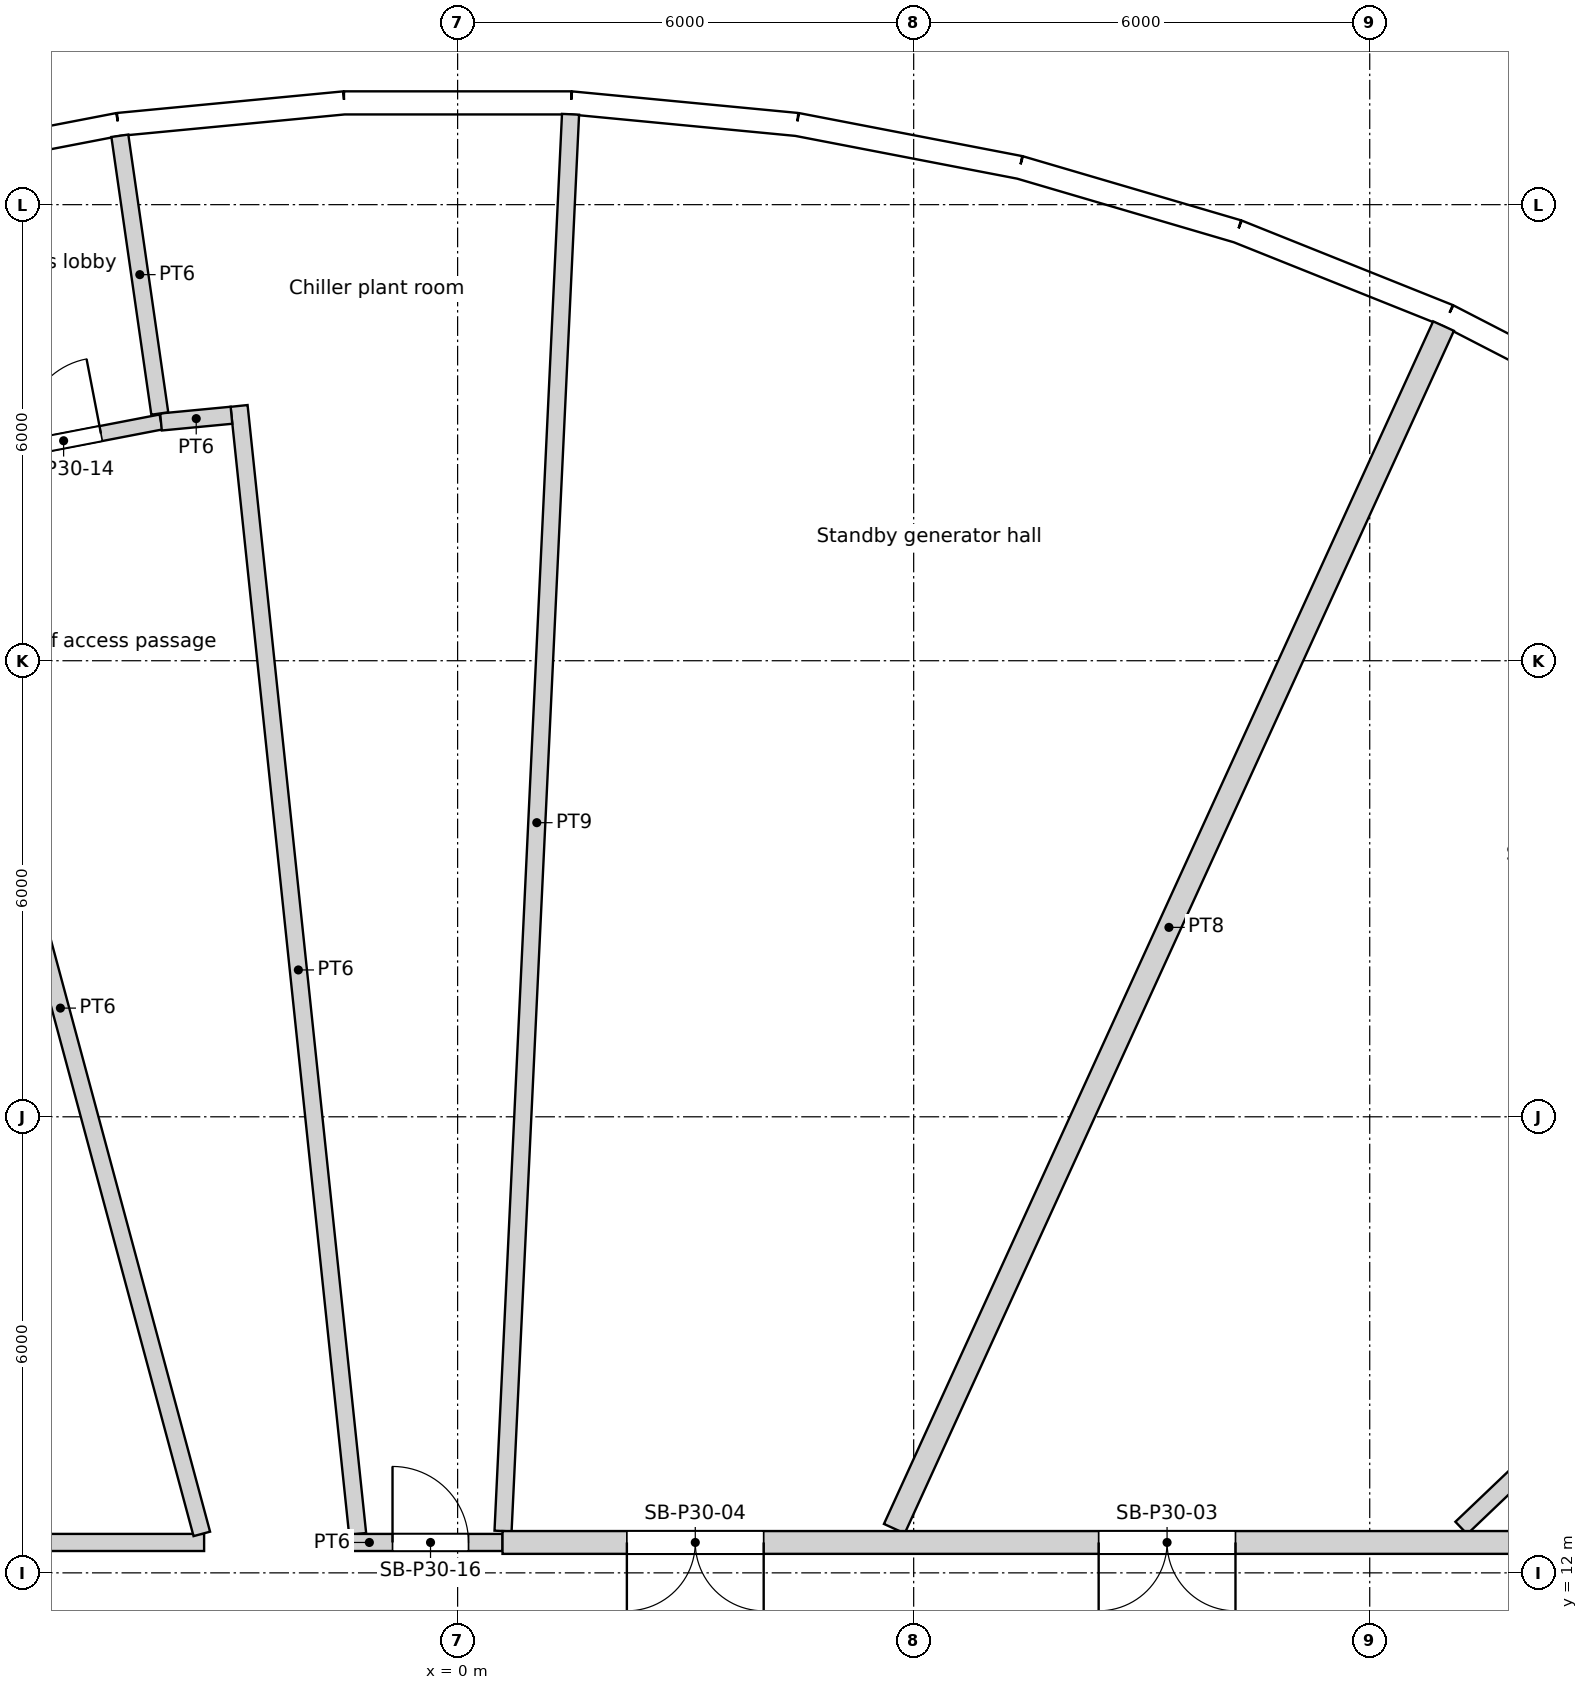
"""IFC4 building model, lengths in metres.
Left out: names, types, materials, properties, quantities, classifications, styles, units other than length and angle.
Written with IfcOpenShell. Run it as: python <this file> out.ifc"""

import sys

from ifc_helpers import new_model, si_unit, direction, frame, frame_2d, origin, origin_2d, place, context, subcontext, project, spatial, rectangle, circle, extrude, element, fill, save


model = new_model("IFC4")
c1 = context("Model", 3, precision=1e-05, world=origin(), true_north=direction((0.0, 1.0)))
c2 = subcontext(c1, "Body", "Model", "MODEL_VIEW")
j1 = project(units=[si_unit("LENGTHUNIT", "METRE"), si_unit("PLANEANGLEUNIT", "RADIAN")], contexts=[c1])
p1 = place(None, origin())
s1 = spatial("IfcSite", under=j1, at=p1, CompositionType="ELEMENT")
p2 = place(p1, origin())
s2 = spatial("IfcBuilding", under=s1, at=p2, CompositionType="ELEMENT")
p3 = place(p2, frame((0.0, 0.0, 120.0)))
s3 = spatial("IfcBuildingStorey", under=s2, at=p3, CompositionType="ELEMENT", Elevation=120.0)
for number, where, z_axis, x_axis in (
    (1, (12.576, 27.539, 0.0), (0.0, 0.0, 1.0), (1.0, 0.0, 0.0)),
    (2, (7.137, 29.421, 0.0), (0.0, 0.0, 1.0), (1.0, 0.0, 0.0)),
    (3, (1.44, 30.24, 0.0), (0.0, 0.0, 1.0), (1.0, 0.0, 0.0)),
    (4, (-4.309, 29.966, 0.0), (0.0, 0.0, 1.0), (1.0, 0.0, 0.0)),
):
    element("IfcColumn", number, at=place(p3, frame(where, z_axis=z_axis, x_axis=x_axis)), inside=s3, PredefinedType="COLUMN", context=c2, shape_type="SweptSolid", body=[
        extrude(circle(Radius=0.6, at=origin_2d()), origin(), (0.0, 0.0, 1.0), 6.0),
    ])
for number, where, z_axis, x_axis in (
    (5, (9.723, 22.54, 0.0), (0.0, 0.0, 1.0), (1.0, 0.0, 0.0)),
    (6, (4.263, 24.175, 0.0), (0.0, 0.0, 1.0), (1.0, 0.0, 0.0)),
    (7, (-1.427, 24.506, 0.0), (0.0, 0.0, 1.0), (1.0, 0.0, 0.0)),
):
    element("IfcColumn", number, at=place(p3, frame(where, z_axis=z_axis, x_axis=x_axis)), inside=s3, PredefinedType="COLUMN", context=c2, shape_type="SweptSolid", body=[
        extrude(circle(Radius=0.65, at=origin_2d()), origin(), (0.0, 0.0, 1.0), 6.0),
    ])
for number, where, z_axis, x_axis in (
    (8, (11.735, 14.716, 0.0), (0.0, 0.0, 1.0), (1.0, 0.0, 0.0)),
    (9, (6.876, 17.521, 0.0), (0.0, 0.0, 1.0), (1.0, 0.0, 0.0)),
    (10, (1.406, 18.77, 0.0), (0.0, 0.0, 1.0), (1.0, 0.0, 0.0)),
    (11, (-4.188, 18.35, 0.0), (0.0, 0.0, 1.0), (1.0, 0.0, 0.0)),
):
    element("IfcColumn", number, at=place(p3, frame(where, z_axis=z_axis, x_axis=x_axis)), inside=s3, PredefinedType="COLUMN", context=c2, shape_type="SweptSolid", body=[
        extrude(circle(Radius=0.7, at=origin_2d()), origin(), (0.0, 0.0, 1.0), 6.0),
    ])
p4 = place(p3, frame((15.687, 27.171, 0.0), z_axis=(0.0, 0.0, 1.0), x_axis=(-0.888831268481, 0.458234630043, 0.0)))
e12 = element("IfcWall", 12, at=p4, inside=s3, PredefinedType="SOLIDWALL", context=c2, shape_type="SweptSolid", body=[
    extrude(rectangle(XDim=2.986, YDim=0.3, at=frame_2d((1.493, 0.0))), origin(), (0.0, 0.0, 1.0), 5.7),
])
p5 = place(p4, frame((1.493, 0.0, 1.8)))
e13 = element("IfcOpeningElement", 13, at=p5, cuts=e12, PredefinedType="OPENING", context=c2, shape_type="SweptSolid", body=[
    extrude(circle(Radius=1.2, at=origin_2d()), frame((0.0, 0.16, 0.0), z_axis=(0.0, -1.0, 0.0), x_axis=(1.0, 0.0, 0.0)), (0.0, 0.0, 1.0), 0.32),
])
p6 = place(p3, frame((13.033, 28.539, 0.0), z_axis=(0.0, 0.0, 1.0), x_axis=(-0.928380795373, 0.371630325434, 0.0)))
e14 = element("IfcWall", 14, at=p6, inside=s3, PredefinedType="SOLIDWALL", context=c2, shape_type="SweptSolid", body=[
    extrude(rectangle(XDim=2.986, YDim=0.3, at=frame_2d((1.493, 0.0))), origin(), (0.0, 0.0, 1.0), 5.7),
])
p7 = place(p6, frame((1.493, 0.0, 1.8)))
e15 = element("IfcOpeningElement", 15, at=p7, cuts=e14, PredefinedType="OPENING", context=c2, shape_type="SweptSolid", body=[
    extrude(circle(Radius=1.2, at=origin_2d()), frame((0.0, 0.16, 0.0), z_axis=(0.0, -1.0, 0.0), x_axis=(1.0, 0.0, 0.0)), (0.0, 0.0, 1.0), 0.32),
])
p8 = place(p3, frame((10.261, 29.649, 0.0), z_axis=(0.0, 0.0, 1.0), x_axis=(-0.959502108153, 0.281701445593, 0.0)))
e16 = element("IfcWall", 16, at=p8, inside=s3, PredefinedType="SOLIDWALL", context=c2, shape_type="SweptSolid", body=[
    extrude(rectangle(XDim=2.986, YDim=0.3, at=frame_2d((1.493, 0.0))), origin(), (0.0, 0.0, 1.0), 5.7),
])
p9 = place(p8, frame((1.493, 0.0, 1.8)))
e17 = element("IfcOpeningElement", 17, at=p9, cuts=e16, PredefinedType="OPENING", context=c2, shape_type="SweptSolid", body=[
    extrude(circle(Radius=1.2, at=origin_2d()), frame((0.0, 0.16, 0.0), z_axis=(0.0, -1.0, 0.0), x_axis=(1.0, 0.0, 0.0)), (0.0, 0.0, 1.0), 0.32),
])
p10 = place(p3, frame((7.397, 30.49, 0.0), z_axis=(0.0, 0.0, 1.0), x_axis=(-0.981918853666, 0.189302310646, 0.0)))
e18 = element("IfcWall", 18, at=p10, inside=s3, PredefinedType="SOLIDWALL", context=c2, shape_type="SweptSolid", body=[
    extrude(rectangle(XDim=2.986, YDim=0.3, at=frame_2d((1.493, 0.0))), origin(), (0.0, 0.0, 1.0), 5.7),
])
p11 = place(p10, frame((1.493, 0.0, 1.8)))
e19 = element("IfcOpeningElement", 19, at=p11, cuts=e18, PredefinedType="OPENING", context=c2, shape_type="SweptSolid", body=[
    extrude(circle(Radius=1.2, at=origin_2d()), frame((0.0, 0.16, 0.0), z_axis=(0.0, -1.0, 0.0), x_axis=(1.0, 0.0, 0.0)), (0.0, 0.0, 1.0), 0.32),
])
p12 = place(p3, frame((4.465, 31.055, 0.0), z_axis=(0.0, 0.0, 1.0), x_axis=(-0.99547560533, 0.095017467833, 0.0)))
e20 = element("IfcWall", 20, at=p12, inside=s3, PredefinedType="SOLIDWALL", context=c2, shape_type="SweptSolid", body=[
    extrude(rectangle(XDim=2.986, YDim=0.3, at=frame_2d((1.493, 0.0))), origin(), (0.0, 0.0, 1.0), 5.7),
])
p13 = place(p12, frame((1.493, 0.0, 1.8)))
e21 = element("IfcOpeningElement", 21, at=p13, cuts=e20, PredefinedType="OPENING", context=c2, shape_type="SweptSolid", body=[
    extrude(circle(Radius=1.2, at=origin_2d()), frame((0.0, 0.16, 0.0), z_axis=(0.0, -1.0, 0.0), x_axis=(1.0, 0.0, 0.0)), (0.0, 0.0, 1.0), 0.32),
])
p14 = place(p3, frame((1.493, 31.339, 0.0), z_axis=(0.0, 0.0, 1.0), x_axis=(-1.0, 0.0, 0.0)))
e22 = element("IfcWall", 22, at=p14, inside=s3, PredefinedType="SOLIDWALL", context=c2, shape_type="SweptSolid", body=[
    extrude(rectangle(XDim=2.986, YDim=0.3, at=frame_2d((1.493, 0.0))), origin(), (0.0, 0.0, 1.0), 5.7),
])
p15 = place(p14, frame((1.493, 0.0, 1.8)))
e23 = element("IfcOpeningElement", 23, at=p15, cuts=e22, PredefinedType="OPENING", context=c2, shape_type="SweptSolid", body=[
    extrude(circle(Radius=1.2, at=origin_2d()), frame((0.0, 0.16, 0.0), z_axis=(0.0, -1.0, 0.0), x_axis=(1.0, 0.0, 0.0)), (0.0, 0.0, 1.0), 0.32),
])
p16 = place(p3, frame((-1.493, 31.339, 0.0), z_axis=(0.0, 0.0, 1.0), x_axis=(-0.99547560533, -0.095017467833, 0.0)))
e24 = element("IfcWall", 24, at=p16, inside=s3, PredefinedType="SOLIDWALL", context=c2, shape_type="SweptSolid", body=[
    extrude(rectangle(XDim=2.986, YDim=0.3, at=frame_2d((1.493, 0.0))), origin(), (0.0, 0.0, 1.0), 5.7),
])
p17 = place(p16, frame((1.493, 0.0, 1.8)))
e25 = element("IfcOpeningElement", 25, at=p17, cuts=e24, PredefinedType="OPENING", context=c2, shape_type="SweptSolid", body=[
    extrude(circle(Radius=1.2, at=origin_2d()), frame((0.0, 0.16, 0.0), z_axis=(0.0, -1.0, 0.0), x_axis=(1.0, 0.0, 0.0)), (0.0, 0.0, 1.0), 0.32),
])
p18 = place(p3, frame((-4.465, 31.055, 0.0), z_axis=(0.0, 0.0, 1.0), x_axis=(-0.981918853666, -0.189302310646, 0.0)))
e26 = element("IfcWall", 26, at=p18, inside=s3, PredefinedType="SOLIDWALL", context=c2, shape_type="SweptSolid", body=[
    extrude(rectangle(XDim=2.986, YDim=0.3, at=frame_2d((1.493, 0.0))), origin(), (0.0, 0.0, 1.0), 5.7),
])
p19 = place(p18, frame((1.493, 0.0, 1.8)))
e27 = element("IfcOpeningElement", 27, at=p19, cuts=e26, PredefinedType="OPENING", context=c2, shape_type="SweptSolid", body=[
    extrude(circle(Radius=1.2, at=origin_2d()), frame((0.0, 0.16, 0.0), z_axis=(0.0, -1.0, 0.0), x_axis=(1.0, 0.0, 0.0)), (0.0, 0.0, 1.0), 0.32),
])
p20 = place(p3, frame((-7.086, 26.347, 0.0), z_axis=(0.0, 0.0, 1.0), x_axis=(0.259707010598, -0.965687459091, 0.0)))
e28 = element("IfcWall", 28, at=p20, inside=s3, PredefinedType="PARTITIONING", context=c2, shape_type="SweptSolid", body=[
    extrude(rectangle(XDim=14.327, YDim=0.225, at=frame_2d((7.163, 0.0))), origin(), (0.0, 0.0, 1.0), 5.2),
])
p21 = place(p3, frame((-4.444, 30.906, 0.0), z_axis=(0.0, 0.0, 1.0), x_axis=(0.142319391599, -0.989820787201, 0.0)))
e29 = element("IfcWall", 29, at=p21, inside=s3, PredefinedType="PARTITIONING", context=c2, shape_type="SweptSolid", body=[
    extrude(rectangle(XDim=3.692, YDim=0.225, at=frame_2d((1.846, 0.0))), origin(), (0.0, 0.0, 1.0), 5.2),
])
p22 = place(p3, frame((-6.465, 26.647, 0.0), z_axis=(0.0, 0.0, 1.0), x_axis=(0.981924271327, 0.18927420685, 0.0)))
e30 = element("IfcWall", 30, at=p22, inside=s3, PredefinedType="PARTITIONING", context=c2, shape_type="SweptSolid", body=[
    extrude(rectangle(XDim=2.609, YDim=0.2, at=frame_2d((1.305, 0.0))), origin(), (0.0, 0.0, 1.0), 5.2),
])
p23 = place(p22, frame((0.805, 0.0, 0.0)))
e31 = element("IfcOpeningElement", 31, at=p23, cuts=e30, PredefinedType="OPENING", context=c2, shape_type="SweptSolid", body=[
    extrude(rectangle(XDim=1.0, YDim=2.1, at=frame_2d((0.5, 1.05))), frame((0.0, 0.1, 0.0), z_axis=(0.0, -1.0, 0.0), x_axis=(1.0, 0.0, 0.0)), (0.0, 0.0, 1.0), 0.2),
])
p24 = place(p3, frame((-3.335, 12.4, 0.0), z_axis=(0.0, 0.0, 1.0), x_axis=(-1.0, 0.0, 0.0)))
e32 = element("IfcWall", 32, at=p24, inside=s3, PredefinedType="PARTITIONING", context=c2, shape_type="SweptSolid", body=[
    extrude(rectangle(XDim=8.375, YDim=0.225, at=frame_2d((4.188, 0.0))), origin(), (0.0, 0.0, 1.0), 5.2),
])
p25 = place(p24, frame((3.631, 0.0, 0.0)))
e33 = element("IfcOpeningElement", 33, at=p25, cuts=e32, PredefinedType="OPENING", context=c2, shape_type="SweptSolid", body=[
    extrude(rectangle(XDim=1.0, YDim=2.1, at=frame_2d((0.5, 1.05))), frame((0.0, 0.113, 0.0), z_axis=(0.0, -1.0, 0.0), x_axis=(1.0, 0.0, 0.0)), (0.0, 0.0, 1.0), 0.225),
])
p26 = place(p3, frame((-2.975, 27.229, 0.0), z_axis=(0.0, 0.0, 1.0), x_axis=(-0.995461237405, -0.095167877055, 0.0)))
e34 = element("IfcWall", 34, at=p26, inside=s3, PredefinedType="PARTITIONING", context=c2, shape_type="SweptSolid", body=[
    extrude(rectangle(XDim=0.931, YDim=0.225, at=frame_2d((0.466, 0.0))), origin(), (0.0, 0.0, 1.0), 5.2),
])
p27 = place(p3, frame((-2.875, 27.352, 0.0), z_axis=(0.0, 0.0, 1.0), x_axis=(0.104532331853, -0.994521488756, 0.0)))
e35 = element("IfcWall", 35, at=p27, inside=s3, PredefinedType="PARTITIONING", context=c2, shape_type="SweptSolid", body=[
    extrude(rectangle(XDim=14.922, YDim=0.225, at=frame_2d((7.461, 0.0))), origin(), (0.0, 0.0, 1.0), 5.2),
])
p28 = place(p3, frame((0.591, 12.4, 0.0), z_axis=(0.0, 0.0, 1.0), x_axis=(-1.0, 0.0, 0.0)))
e36 = element("IfcWall", 36, at=p28, inside=s3, PredefinedType="PARTITIONING", context=c2, shape_type="SweptSolid", body=[
    extrude(rectangle(XDim=2.007, YDim=0.225, at=frame_2d((1.003, 0.0))), origin(), (0.0, 0.0, 1.0), 5.2),
])
p29 = place(p28, frame((0.447, 0.0, 0.0)))
e37 = element("IfcOpeningElement", 37, at=p29, cuts=e36, PredefinedType="OPENING", context=c2, shape_type="SweptSolid", body=[
    extrude(rectangle(XDim=1.0, YDim=2.1, at=frame_2d((0.5, 1.05))), frame((0.0, 0.113, 0.0), z_axis=(0.0, -1.0, 0.0), x_axis=(1.0, 0.0, 0.0)), (0.0, 0.0, 1.0), 0.225),
])
p30 = place(p3, frame((1.486, 31.189, 0.0), z_axis=(0.0, 0.0, 1.0), x_axis=(-0.047571987226, -0.998867812091, 0.0)))
e38 = element("IfcWall", 38, at=p30, inside=s3, PredefinedType="PARTITIONING", context=c2, shape_type="SweptSolid", body=[
    extrude(rectangle(XDim=18.66, YDim=0.225, at=frame_2d((9.33, 0.0))), origin(), (0.0, 0.0, 1.0), 2.7),
])
p31 = place(p3, frame((12.971, 28.403, 0.0), z_axis=(0.0, 0.0, 1.0), x_axis=(-0.415415069181, -0.909631969698, 0.0)))
e39 = element("IfcWall", 39, at=p31, inside=s3, PredefinedType="PARTITIONING", context=c2, shape_type="SweptSolid", body=[
    extrude(rectangle(XDim=17.393, YDim=0.3, at=frame_2d((8.697, 0.0))), origin(), (0.0, 0.0, 1.0), 5.2),
])
p32 = place(p3, frame((17.902, 12.4, 0.0), z_axis=(0.0, 0.0, 1.0), x_axis=(-1.0, 0.0, 0.0)))
e40 = element("IfcWall", 40, at=p32, inside=s3, PredefinedType="PARTITIONING", context=c2, shape_type="SweptSolid", body=[
    extrude(rectangle(XDim=17.311, YDim=0.3, at=frame_2d((8.655, 0.0))), origin(), (0.0, 0.0, 1.0), 5.2),
])
p33 = place(p32, frame((7.668, 0.0, 0.0)))
e41 = element("IfcOpeningElement", 41, at=p33, cuts=e40, PredefinedType="OPENING", context=c2, shape_type="SweptSolid", body=[
    extrude(rectangle(XDim=1.8, YDim=2.4, at=frame_2d((0.9, 1.2))), frame((0.0, 0.15, 0.0), z_axis=(0.0, -1.0, 0.0), x_axis=(1.0, 0.0, 0.0)), (0.0, 0.0, 1.0), 0.3),
])
p34 = place(p32, frame((13.875, 0.0, 0.0)))
e42 = element("IfcOpeningElement", 42, at=p34, cuts=e40, PredefinedType="OPENING", context=c2, shape_type="SweptSolid", body=[
    extrude(rectangle(XDim=1.8, YDim=2.4, at=frame_2d((0.9, 1.2))), frame((0.0, 0.15, 0.0), z_axis=(0.0, -1.0, 0.0), x_axis=(1.0, 0.0, 0.0)), (0.0, 0.0, 1.0), 0.3),
])
p35 = place(p3, frame((22.598, 21.547, 0.0), z_axis=(0.0, 0.0, 1.0), x_axis=(-0.723750872009, -0.690061356161, 0.0)))
e43 = element("IfcWall", 43, at=p35, inside=s3, PredefinedType="PARTITIONING", context=c2, shape_type="SweptSolid", body=[
    extrude(rectangle(XDim=12.979, YDim=0.225, at=frame_2d((6.49, 0.0))), origin(), (0.0, 0.0, 1.0), 2.7),
])
p36 = place(p5, origin())
e44 = element("IfcWindow", 44, at=p36, inside=s3, PartitioningType="SINGLE_PANEL", PredefinedType="WINDOW", context=c2, shape_type="SweptSolid", body=[
    extrude(circle(Radius=1.2, at=origin_2d()), frame((0.0, 0.12, 0.0), z_axis=(0.0, -1.0, 0.0), x_axis=(1.0, 0.0, 0.0)), (0.0, 0.0, 1.0), 0.1),
])
fill(e13, e44)
p37 = place(p7, origin())
e45 = element("IfcWindow", 45, at=p37, inside=s3, PartitioningType="SINGLE_PANEL", PredefinedType="WINDOW", context=c2, shape_type="SweptSolid", body=[
    extrude(circle(Radius=1.2, at=origin_2d()), frame((0.0, 0.12, 0.0), z_axis=(0.0, -1.0, 0.0), x_axis=(1.0, 0.0, 0.0)), (0.0, 0.0, 1.0), 0.1),
])
fill(e15, e45)
p38 = place(p9, origin())
e46 = element("IfcWindow", 46, at=p38, inside=s3, PartitioningType="SINGLE_PANEL", PredefinedType="WINDOW", context=c2, shape_type="SweptSolid", body=[
    extrude(circle(Radius=1.2, at=origin_2d()), frame((0.0, 0.12, 0.0), z_axis=(0.0, -1.0, 0.0), x_axis=(1.0, 0.0, 0.0)), (0.0, 0.0, 1.0), 0.1),
])
fill(e17, e46)
p39 = place(p11, origin())
e47 = element("IfcWindow", 47, at=p39, inside=s3, PartitioningType="SINGLE_PANEL", PredefinedType="WINDOW", context=c2, shape_type="SweptSolid", body=[
    extrude(circle(Radius=1.2, at=origin_2d()), frame((0.0, 0.12, 0.0), z_axis=(0.0, -1.0, 0.0), x_axis=(1.0, 0.0, 0.0)), (0.0, 0.0, 1.0), 0.1),
])
fill(e19, e47)
p40 = place(p13, origin())
e48 = element("IfcWindow", 48, at=p40, inside=s3, PartitioningType="SINGLE_PANEL", PredefinedType="WINDOW", context=c2, shape_type="SweptSolid", body=[
    extrude(circle(Radius=1.2, at=origin_2d()), frame((0.0, 0.12, 0.0), z_axis=(0.0, -1.0, 0.0), x_axis=(1.0, 0.0, 0.0)), (0.0, 0.0, 1.0), 0.1),
])
fill(e21, e48)
p41 = place(p15, origin())
e49 = element("IfcWindow", 49, at=p41, inside=s3, PartitioningType="SINGLE_PANEL", PredefinedType="WINDOW", context=c2, shape_type="SweptSolid", body=[
    extrude(circle(Radius=1.2, at=origin_2d()), frame((0.0, 0.12, 0.0), z_axis=(0.0, -1.0, 0.0), x_axis=(1.0, 0.0, 0.0)), (0.0, 0.0, 1.0), 0.1),
])
fill(e23, e49)
p42 = place(p17, origin())
e50 = element("IfcWindow", 50, at=p42, inside=s3, PartitioningType="SINGLE_PANEL", PredefinedType="WINDOW", context=c2, shape_type="SweptSolid", body=[
    extrude(circle(Radius=1.2, at=origin_2d()), frame((0.0, 0.12, 0.0), z_axis=(0.0, -1.0, 0.0), x_axis=(1.0, 0.0, 0.0)), (0.0, 0.0, 1.0), 0.1),
])
fill(e25, e50)
p43 = place(p19, origin())
e51 = element("IfcWindow", 51, at=p43, inside=s3, PartitioningType="SINGLE_PANEL", PredefinedType="WINDOW", context=c2, shape_type="SweptSolid", body=[
    extrude(circle(Radius=1.2, at=origin_2d()), frame((0.0, 0.12, 0.0), z_axis=(0.0, -1.0, 0.0), x_axis=(1.0, 0.0, 0.0)), (0.0, 0.0, 1.0), 0.1),
])
fill(e27, e51)
p44 = place(p33, origin())
e52 = element("IfcDoor", 52, at=p44, inside=s3, OperationType="DOUBLE_DOOR_SINGLE_SWING", PredefinedType="DOOR", context=c2, shape_type="SweptSolid", body=[
    extrude(rectangle(XDim=1.8, YDim=2.4, at=frame_2d((0.9, 1.2))), frame((0.0, 0.025, 0.0), z_axis=(0.0, -1.0, 0.0), x_axis=(1.0, 0.0, 0.0)), (0.0, 0.0, 1.0), 0.05),
])
fill(e41, e52)
p45 = place(p34, origin())
e53 = element("IfcDoor", 53, at=p45, inside=s3, OperationType="DOUBLE_DOOR_SINGLE_SWING", PredefinedType="DOOR", context=c2, shape_type="SweptSolid", body=[
    extrude(rectangle(XDim=1.8, YDim=2.4, at=frame_2d((0.9, 1.2))), frame((0.0, 0.025, 0.0), z_axis=(0.0, -1.0, 0.0), x_axis=(1.0, 0.0, 0.0)), (0.0, 0.0, 1.0), 0.05),
])
fill(e42, e53)
p46 = place(p23, origin())
e54 = element("IfcDoor", 54, at=p46, inside=s3, OperationType="SINGLE_SWING_RIGHT", PredefinedType="DOOR", context=c2, shape_type="SweptSolid", body=[
    extrude(rectangle(XDim=1.0, YDim=2.1, at=frame_2d((0.5, 1.05))), frame((0.0, 0.025, 0.0), z_axis=(0.0, -1.0, 0.0), x_axis=(1.0, 0.0, 0.0)), (0.0, 0.0, 1.0), 0.05),
])
fill(e31, e54)
p47 = place(p29, origin())
e55 = element("IfcDoor", 55, at=p47, inside=s3, OperationType="SINGLE_SWING_LEFT", PredefinedType="DOOR", context=c2, shape_type="SweptSolid", body=[
    extrude(rectangle(XDim=1.0, YDim=2.1, at=frame_2d((0.5, 1.05))), frame((0.0, 0.025, 0.0), z_axis=(0.0, -1.0, 0.0), x_axis=(1.0, 0.0, 0.0)), (0.0, 0.0, 1.0), 0.05),
])
fill(e37, e55)
save(model, sys.argv[1])
